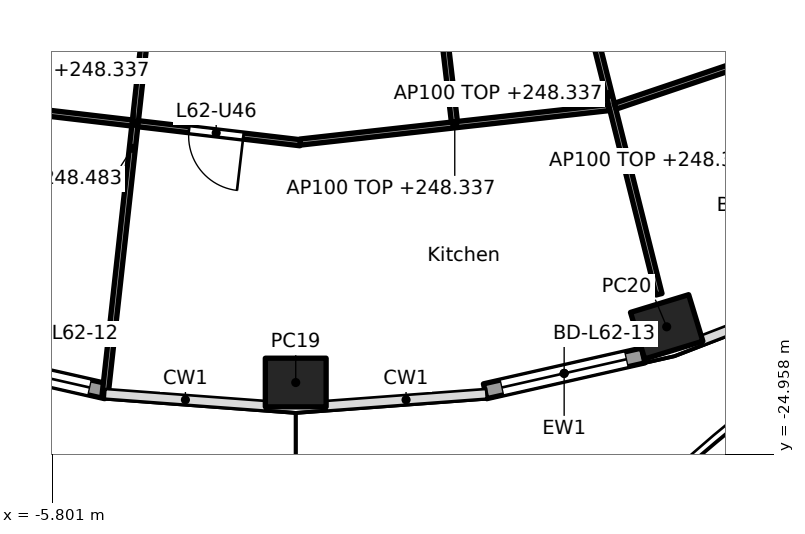
"""IFC4 building model, lengths in metres.
Left out: names, types, materials, properties, quantities, classifications, styles, units other than length and angle.
Written with IfcOpenShell. Run it as: python <this file> out.ifc"""

import sys

from ifc_helpers import new_model, si_unit, direction, frame, frame_2d, origin, origin_2d, place, context, subcontext, project, spatial, rectangle, hollow_rectangle, extrude, element, fill, save


model = new_model("IFC4")
c1 = context("Model", 3, precision=1e-05, world=origin(), true_north=direction((0.0, 1.0)))
c2 = subcontext(c1, "Body", "Model", "MODEL_VIEW")
j1 = project(units=[si_unit("LENGTHUNIT", "METRE"), si_unit("PLANEANGLEUNIT", "RADIAN")], contexts=[c1])
p1 = place(None, origin())
s1 = spatial("IfcSite", under=j1, at=p1, CompositionType="ELEMENT")
p2 = place(p1, origin())
s2 = spatial("IfcBuilding", under=s1, at=p2, CompositionType="ELEMENT")
p3 = place(p2, frame((0.0, 0.0, 245.5)))
s3 = spatial("IfcBuildingStorey", under=s2, at=p3, CompositionType="ELEMENT", Elevation=245.5)
for number, where, z_axis, x_axis in (
    (1, (-1.8, -23.772, 0.0), (0.0, 0.0, 1.0), (1.0, 0.0, 0.0)),
    (2, (4.3, -22.856, 0.0), (0.0, 0.0, 1.0), (0.957, 0.292, 0.0)),
):
    element("IfcColumn", number, at=place(p3, frame(where, z_axis=z_axis, x_axis=x_axis)), inside=s3, PredefinedType="COLUMN", context=c2, shape_type="SweptSolid", body=[
        extrude(hollow_rectangle(XDim=1.0, YDim=0.8, WallThickness=0.032, at=origin_2d()), origin(), (0.0, 0.0, 1.0), 3.7),
    ])
p4 = place(p3, frame((-4.914, -23.916, 0.0), z_axis=(0.0, 0.0, 1.0), x_axis=(-0.975324089124, 0.220777990694, 0.0)))
e3 = element("IfcWall", 3, at=p4, inside=s3, PredefinedType="SOLIDWALL", context=c2, shape_type="SweptSolid", body=[
    extrude(rectangle(XDim=2.666, YDim=0.25, at=frame_2d((1.333, 0.0))), origin(), (0.0, 0.0, 1.0), 3.44),
])
p5 = place(p4, frame((0.283, 0.0, 0.0)))
e4 = element("IfcOpeningElement", 4, at=p5, cuts=e3, PredefinedType="OPENING", context=c2, shape_type="SweptSolid", body=[
    extrude(rectangle(XDim=2.1, YDim=2.4, at=frame_2d((1.05, 1.2))), frame((0.0, 0.135, 0.0), z_axis=(0.0, -1.0, 0.0), x_axis=(1.0, 0.0, 0.0)), (0.0, 0.0, 1.0), 0.27),
])
p6 = place(p3, frame((3.915, -23.327, 0.0), z_axis=(0.0, 0.0, 1.0), x_axis=(-0.975324089124, -0.220777990694, 0.0)))
e5 = element("IfcWall", 5, at=p6, inside=s3, PredefinedType="SOLIDWALL", context=c2, shape_type="SweptSolid", body=[
    extrude(rectangle(XDim=2.666, YDim=0.25, at=frame_2d((1.333, 0.0))), origin(), (0.0, 0.0, 1.0), 3.44),
])
p7 = place(p6, frame((0.283, 0.0, 0.0)))
e6 = element("IfcOpeningElement", 6, at=p7, cuts=e5, PredefinedType="OPENING", context=c2, shape_type="SweptSolid", body=[
    extrude(rectangle(XDim=2.1, YDim=2.4, at=frame_2d((1.05, 1.2))), frame((0.0, 0.135, 0.0), z_axis=(0.0, -1.0, 0.0), x_axis=(1.0, 0.0, 0.0)), (0.0, 0.0, 1.0), 0.27),
])
p8 = place(p3, frame((-7.156, -19.191, 0.0), z_axis=(0.0, 0.0, 1.0), x_axis=(0.9931716165, -0.116662505458, 0.0)))
e7 = element("IfcWall", 7, at=p8, inside=s3, PredefinedType="PARTITIONING", context=c2, shape_type="SweptSolid", body=[
    extrude(rectangle(XDim=5.468, YDim=0.1, at=frame_2d((2.734, 0.0))), origin(), (0.0, 0.0, 1.0), 2.837),
])
p9 = place(p8, frame((3.626, 0.0, 0.0)))
e8 = element("IfcOpeningElement", 8, at=p9, cuts=e7, PredefinedType="OPENING", context=c2, shape_type="SweptSolid", body=[
    extrude(rectangle(XDim=0.9, YDim=2.1, at=frame_2d((0.45, 1.05))), frame((0.0, 0.06, 0.0), z_axis=(0.0, -1.0, 0.0), x_axis=(1.0, 0.0, 0.0)), (0.0, 0.0, 1.0), 0.12),
])
p10 = place(p3, frame((-4.036, -15.844, 0.0), z_axis=(0.0, 0.0, 1.0), x_axis=(-0.109804423508, -0.993953212469, 0.0)))
e9 = element("IfcWall", 9, at=p10, inside=s3, PredefinedType="PARTITIONING", context=c2, shape_type="SweptSolid", body=[
    extrude(rectangle(XDim=8.204, YDim=0.1, at=frame_2d((4.102, 0.0))), origin(), (0.0, 0.0, 1.0), 2.983),
])
p11 = place(p10, frame((1.419, 0.0, 0.0)))
e10 = element("IfcOpeningElement", 10, at=p11, cuts=e9, PredefinedType="OPENING", context=c2, shape_type="SweptSolid", body=[
    extrude(rectangle(XDim=0.9, YDim=2.1, at=frame_2d((0.45, 1.05))), frame((0.0, 0.06, 0.0), z_axis=(0.0, -1.0, 0.0), x_axis=(1.0, 0.0, 0.0)), (0.0, 0.0, 1.0), 0.12),
])
p12 = place(p3, frame((-1.726, -19.818, 0.0), z_axis=(0.0, 0.0, 1.0), x_axis=(0.99381893047, 0.111013212902, 0.0)))
e11 = element("IfcWall", 11, at=p12, inside=s3, PredefinedType="PARTITIONING", context=c2, shape_type="SweptSolid", body=[
    extrude(rectangle(XDim=5.113, YDim=0.1, at=frame_2d((2.557, 0.0))), origin(), (0.0, 0.0, 1.0), 2.837),
])
p13 = place(p3, frame((0.012, -12.664, 0.0), z_axis=(0.0, 0.0, 1.0), x_axis=(0.116154290925, -0.993231181901, 0.0)))
e12 = element("IfcWall", 12, at=p13, inside=s3, PredefinedType="PARTITIONING", context=c2, shape_type="SweptSolid", body=[
    extrude(rectangle(XDim=6.867, YDim=0.1, at=frame_2d((3.433, 0.0))), origin(), (0.0, 0.0, 1.0), 2.762),
])
p14 = place(p13, frame((1.198, 0.0, 0.0)))
e13 = element("IfcOpeningElement", 13, at=p14, cuts=e12, PredefinedType="OPENING", context=c2, shape_type="SweptSolid", body=[
    extrude(rectangle(XDim=0.9, YDim=2.1, at=frame_2d((0.45, 1.05))), frame((0.0, 0.06, 0.0), z_axis=(0.0, -1.0, 0.0), x_axis=(1.0, 0.0, 0.0)), (0.0, 0.0, 1.0), 0.12),
])
p15 = place(p13, frame((4.631, 0.0, 0.0)))
e14 = element("IfcOpeningElement", 14, at=p15, cuts=e12, PredefinedType="OPENING", context=c2, shape_type="SweptSolid", body=[
    extrude(rectangle(XDim=0.9, YDim=2.1, at=frame_2d((0.45, 1.05))), frame((0.0, 0.06, 0.0), z_axis=(0.0, -1.0, 0.0), x_axis=(1.0, 0.0, 0.0)), (0.0, 0.0, 1.0), 0.12),
])
p16 = place(p3, frame((2.531, -15.749, 0.0), z_axis=(0.0, 0.0, 1.0), x_axis=(0.242645858264, -0.970114935184, 0.0)))
e15 = element("IfcWall", 15, at=p16, inside=s3, PredefinedType="PARTITIONING", context=c2, shape_type="SweptSolid", body=[
    extrude(rectangle(XDim=6.774, YDim=0.1, at=frame_2d((3.387, 0.0))), origin(), (0.0, 0.0, 1.0), 2.837),
])
p17 = place(p3, frame((3.453, -19.229, 0.0), z_axis=(0.0, 0.0, 1.0), x_axis=(0.947565610716, 0.31956128268, 0.0)))
e16 = element("IfcWall", 16, at=p17, inside=s3, PredefinedType="PARTITIONING", context=c2, shape_type="SweptSolid", body=[
    extrude(rectangle(XDim=4.853, YDim=0.1, at=frame_2d((2.426, 0.0))), origin(), (0.0, 0.0, 1.0), 2.837),
])
p18 = place(p17, frame((1.976, 0.0, 0.0)))
e17 = element("IfcOpeningElement", 17, at=p18, cuts=e16, PredefinedType="OPENING", context=c2, shape_type="SweptSolid", body=[
    extrude(rectangle(XDim=0.9, YDim=2.1, at=frame_2d((0.45, 1.05))), frame((0.0, 0.06, 0.0), z_axis=(0.0, -1.0, 0.0), x_axis=(1.0, 0.0, 0.0)), (0.0, 0.0, 1.0), 0.12),
])
p19 = place(p5, origin())
e18 = element("IfcDoor", 18, at=p19, inside=s3, OperationType="SLIDING_TO_LEFT", PredefinedType="DOOR", context=c2, shape_type="SweptSolid", body=[
    extrude(rectangle(XDim=2.1, YDim=2.4, at=frame_2d((1.05, 1.2))), frame((0.0, 0.025, 0.0), z_axis=(0.0, -1.0, 0.0), x_axis=(1.0, 0.0, 0.0)), (0.0, 0.0, 1.0), 0.05),
])
fill(e4, e18)
p20 = place(p7, origin())
e19 = element("IfcDoor", 19, at=p20, inside=s3, OperationType="SLIDING_TO_LEFT", PredefinedType="DOOR", context=c2, shape_type="SweptSolid", body=[
    extrude(rectangle(XDim=2.1, YDim=2.4, at=frame_2d((1.05, 1.2))), frame((0.0, 0.025, 0.0), z_axis=(0.0, -1.0, 0.0), x_axis=(1.0, 0.0, 0.0)), (0.0, 0.0, 1.0), 0.05),
])
fill(e6, e19)
p21 = place(p9, frame((0.9, 0.0, 0.0), x_axis=(-1.0, 0.0, 0.0)))
e20 = element("IfcDoor", 20, at=p21, inside=s3, OperationType="SINGLE_SWING_LEFT", PredefinedType="DOOR", context=c2, shape_type="SweptSolid", body=[
    extrude(rectangle(XDim=0.9, YDim=2.1, at=frame_2d((0.45, 1.05))), frame((0.0, 0.025, 0.0), z_axis=(0.0, -1.0, 0.0), x_axis=(1.0, 0.0, 0.0)), (0.0, 0.0, 1.0), 0.05),
])
fill(e8, e20)
save(model, sys.argv[1])
